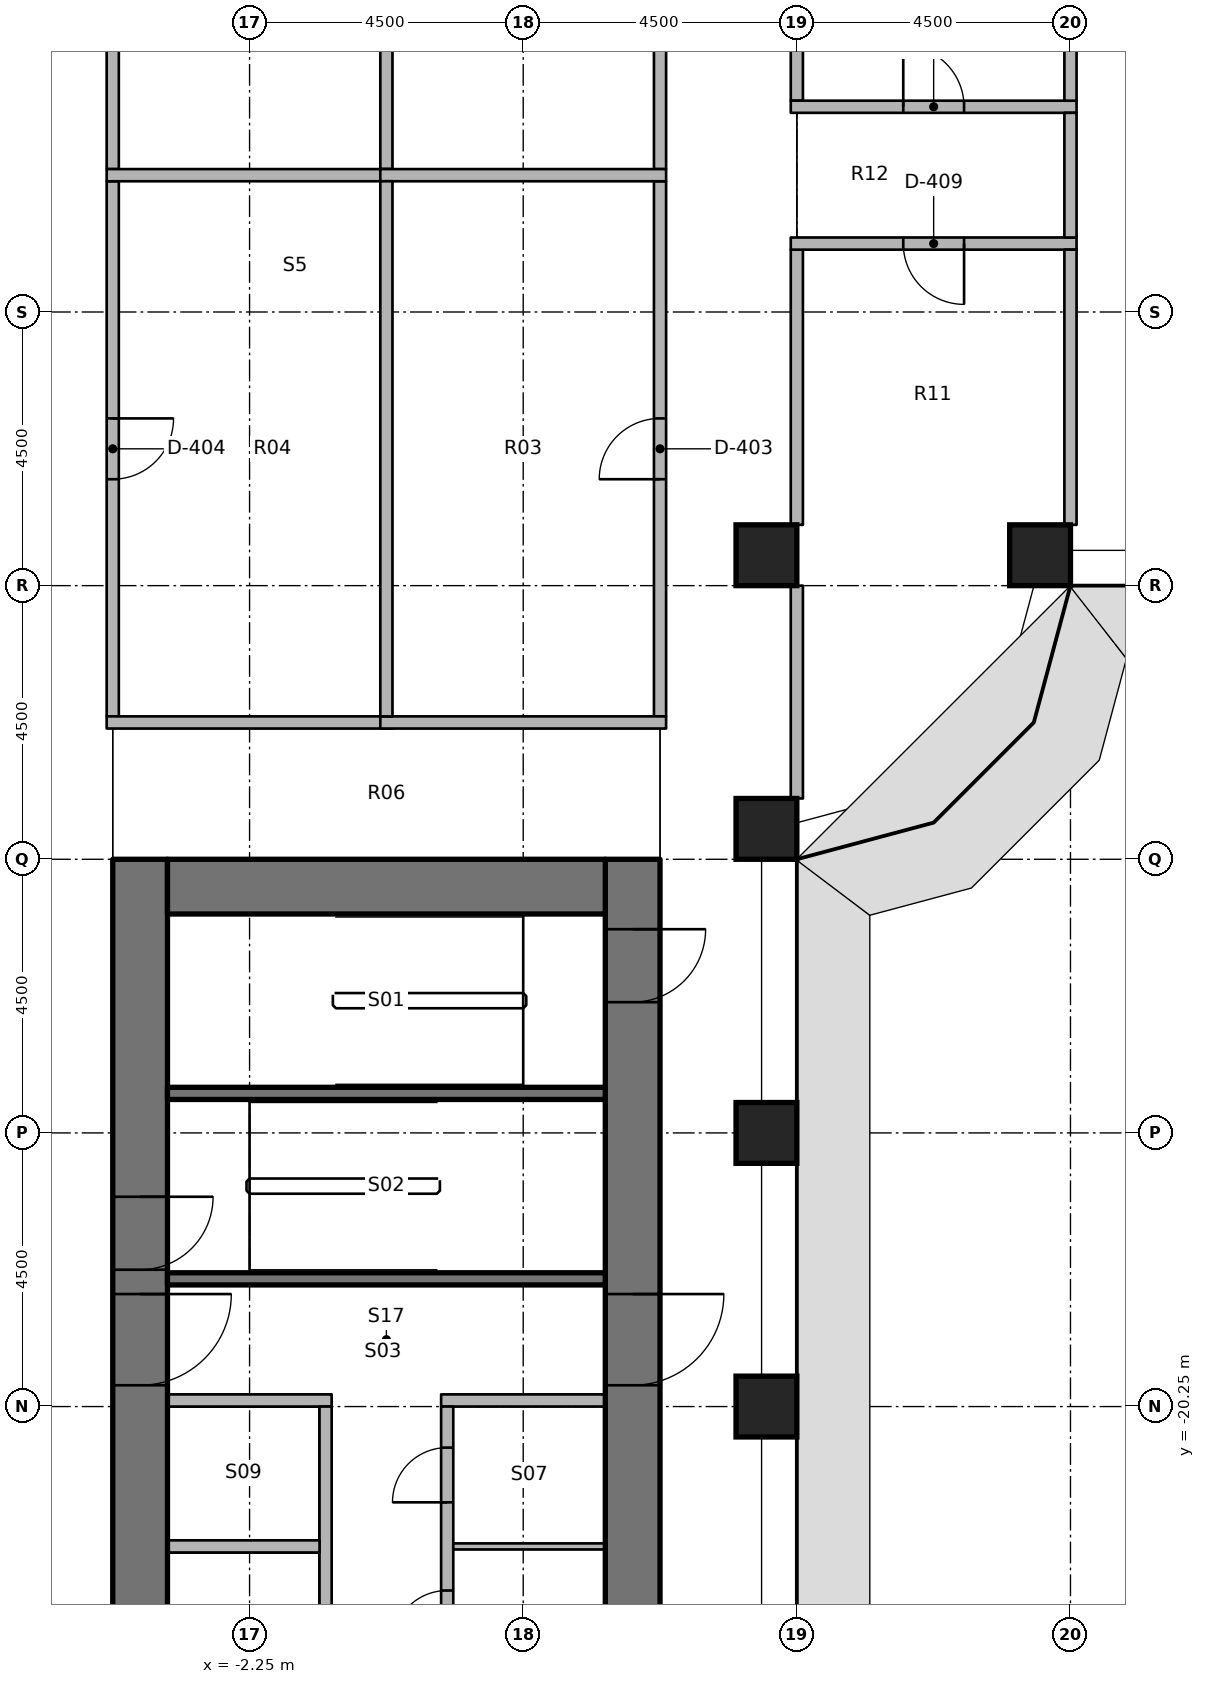
"""IFC4 building model, lengths in metres.
Left out: names, types, materials, properties, quantities, classifications, styles, units other than length and angle.
Written with IfcOpenShell. Run it as: python <this file> out.ifc"""

import sys

from ifc_helpers import new_model, si_unit, direction, frame, frame_2d, origin, origin_2d, place, context, subcontext, project, spatial, rectangle, extrude, element, fill, save


model = new_model("IFC4")
c1 = context("Model", 3, precision=1e-05, world=origin(), true_north=direction((0.0, 1.0)))
c2 = subcontext(c1, "Body", "Model", "MODEL_VIEW")
j1 = project(units=[si_unit("LENGTHUNIT", "METRE"), si_unit("PLANEANGLEUNIT", "RADIAN")], contexts=[c1])
p1 = place(None, origin())
s1 = spatial("IfcSite", under=j1, at=p1, CompositionType="ELEMENT")
p2 = place(p1, origin())
s2 = spatial("IfcBuilding", under=s1, at=p2, CompositionType="ELEMENT")
p3 = place(p2, frame((0.0, 0.0, 56.4)))
s3 = spatial("IfcBuildingStorey", under=s2, at=p3, CompositionType="ELEMENT", Elevation=56.4)
for number, where, z_axis, x_axis in (
    (1, (6.25, -20.25, 0.0), (0.0, 0.0, 1.0), (1.0, 0.0, 0.0)),
    (2, (6.25, -15.75, 0.0), (0.0, 0.0, 1.0), (1.0, 0.0, 0.0)),
    (3, (6.25, -10.75, 0.0), (0.0, 0.0, 1.0), (1.0, 0.0, 0.0)),
    (4, (6.25, -6.25, 0.0), (0.0, 0.0, 1.0), (1.0, 0.0, 0.0)),
    (5, (10.75, -6.25, 0.0), (0.0, 0.0, 1.0), (1.0, 0.0, 0.0)),
):
    element("IfcColumn", number, at=place(p3, frame(where, z_axis=z_axis, x_axis=x_axis)), inside=s3, PredefinedType="COLUMN", context=c2, shape_type="SweptSolid", body=[
        extrude(rectangle(XDim=1.0, YDim=1.0, at=origin_2d()), origin(), (0.0, 0.0, 1.0), 4.05),
    ])
p4 = place(p3, frame((-4.05, -11.25, 0.0), z_axis=(0.0, 0.0, 1.0), x_axis=(0.0, -1.0, 0.0)))
e6 = element("IfcWall", 6, at=p4, inside=s3, PredefinedType="SHEAR", context=c2, shape_type="SweptSolid", body=[
    extrude(rectangle(XDim=15.0, YDim=0.9, at=frame_2d((7.5, 0.0))), origin(), (0.0, 0.0, 1.0), 4.2),
])
p5 = place(p4, frame((7.15, 0.0, 0.0)))
e7 = element("IfcOpeningElement", 7, at=p5, cuts=e6, PredefinedType="OPENING", context=c2, shape_type="SweptSolid", body=[
    extrude(rectangle(XDim=1.5, YDim=2.3, at=frame_2d((0.75, 1.15))), frame((0.0, 0.46, 0.0), z_axis=(0.0, -1.0, 0.0), x_axis=(1.0, 0.0, 0.0)), (0.0, 0.0, 1.0), 0.92),
])
p6 = place(p4, frame((5.55, 0.0, 0.0)))
e8 = element("IfcOpeningElement", 8, at=p6, cuts=e6, PredefinedType="OPENING", context=c2, shape_type="SweptSolid", body=[
    extrude(rectangle(XDim=1.2, YDim=2.1, at=frame_2d((0.6, 1.05))), frame((0.0, 0.46, 0.0), z_axis=(0.0, -1.0, 0.0), x_axis=(1.0, 0.0, 0.0)), (0.0, 0.0, 1.0), 0.92),
])
p7 = place(p3, frame((4.05, -11.25, 0.0), z_axis=(0.0, 0.0, 1.0), x_axis=(0.0, -1.0, 0.0)))
e9 = element("IfcWall", 9, at=p7, inside=s3, PredefinedType="SHEAR", context=c2, shape_type="SweptSolid", body=[
    extrude(rectangle(XDim=15.0, YDim=0.9, at=frame_2d((7.5, 0.0))), origin(), (0.0, 0.0, 1.0), 4.2),
])
p8 = place(p7, frame((7.15, 0.0, 0.0)))
e10 = element("IfcOpeningElement", 10, at=p8, cuts=e9, PredefinedType="OPENING", context=c2, shape_type="SweptSolid", body=[
    extrude(rectangle(XDim=1.5, YDim=2.3, at=frame_2d((0.75, 1.15))), frame((0.0, 0.46, 0.0), z_axis=(0.0, -1.0, 0.0), x_axis=(1.0, 0.0, 0.0)), (0.0, 0.0, 1.0), 0.92),
])
p9 = place(p7, frame((13.9, 0.0, 0.0)))
e11 = element("IfcOpeningElement", 11, at=p9, cuts=e9, PredefinedType="OPENING", context=c2, shape_type="SweptSolid", body=[
    extrude(rectangle(XDim=0.9, YDim=2.1, at=frame_2d((0.45, 1.05))), frame((0.0, 0.46, 0.0), z_axis=(0.0, -1.0, 0.0), x_axis=(1.0, 0.0, 0.0)), (0.0, 0.0, 1.0), 0.92),
])
p10 = place(p7, frame((1.15, 0.0, 0.0)))
e12 = element("IfcOpeningElement", 12, at=p10, cuts=e9, PredefinedType="OPENING", context=c2, shape_type="SweptSolid", body=[
    extrude(rectangle(XDim=1.2, YDim=2.1, at=frame_2d((0.6, 1.05))), frame((0.0, 0.46, 0.0), z_axis=(0.0, -1.0, 0.0), x_axis=(1.0, 0.0, 0.0)), (0.0, 0.0, 1.0), 0.92),
])
p11 = place(p3, frame((-3.6, -11.7, 0.0), z_axis=(0.0, 0.0, 1.0), x_axis=(1.0, 0.0, 0.0)))
e13 = element("IfcWall", 13, at=p11, inside=s3, PredefinedType="SHEAR", context=c2, shape_type="SweptSolid", body=[
    extrude(rectangle(XDim=7.2, YDim=0.9, at=frame_2d((3.6, 0.0))), origin(), (0.0, 0.0, 1.0), 4.2),
])
for number, where, z_axis, x_axis in (
    (14, (3.6, -18.15, 0.0), (0.0, 0.0, 1.0), (-1.0, 0.0, 0.0)),
    (15, (3.6, -15.1, 0.0), (0.0, 0.0, 1.0), (-1.0, 0.0, 0.0)),
):
    element("IfcWall", number, at=place(p3, frame(where, z_axis=z_axis, x_axis=x_axis)), inside=s3, PredefinedType="SHEAR", context=c2, shape_type="SweptSolid", body=[
        extrude(rectangle(XDim=7.2, YDim=0.2, at=frame_2d((3.6, 0.0))), origin(), (0.0, 0.0, 1.0), 4.05),
    ])
p12 = place(p3, frame((3.6, -20.15, 0.0), z_axis=(0.0, 0.0, 1.0), x_axis=(-1.0, 0.0, 0.0)))
e16 = element("IfcWall", 16, at=p12, inside=s3, PredefinedType="PARTITIONING", context=c2, shape_type="SweptSolid", body=[
    extrude(rectangle(XDim=2.7, YDim=0.2, at=frame_2d((1.35, 0.0))), origin(), (0.0, 0.0, 1.0), 4.05),
])
p13 = place(p3, frame((1.0, -24.85, 0.0), z_axis=(0.0, 0.0, 1.0), x_axis=(0.0, 1.0, 0.0)))
e17 = element("IfcWall", 17, at=p13, inside=s3, PredefinedType="PARTITIONING", context=c2, shape_type="SweptSolid", body=[
    extrude(rectangle(XDim=4.6, YDim=0.2, at=frame_2d((2.3, 0.0))), origin(), (0.0, 0.0, 1.0), 4.05),
])
p14 = place(p13, frame((0.675, 0.0, 0.0)))
e18 = element("IfcOpeningElement", 18, at=p14, cuts=e17, PredefinedType="OPENING", context=c2, shape_type="SweptSolid", body=[
    extrude(rectangle(XDim=0.9, YDim=2.1, at=frame_2d((0.45, 1.05))), frame((0.0, 0.11, 0.0), z_axis=(0.0, -1.0, 0.0), x_axis=(1.0, 0.0, 0.0)), (0.0, 0.0, 1.0), 0.22),
])
p15 = place(p13, frame((3.025, 0.0, 0.0)))
e19 = element("IfcOpeningElement", 19, at=p15, cuts=e17, PredefinedType="OPENING", context=c2, shape_type="SweptSolid", body=[
    extrude(rectangle(XDim=0.9, YDim=2.1, at=frame_2d((0.45, 1.05))), frame((0.0, 0.11, 0.0), z_axis=(0.0, -1.0, 0.0), x_axis=(1.0, 0.0, 0.0)), (0.0, 0.0, 1.0), 0.22),
])
p16 = place(p3, frame((-0.9, -20.15, 0.0), z_axis=(0.0, 0.0, 1.0), x_axis=(-1.0, 0.0, 0.0)))
e20 = element("IfcWall", 20, at=p16, inside=s3, PredefinedType="PARTITIONING", context=c2, shape_type="SweptSolid", body=[
    extrude(rectangle(XDim=2.7, YDim=0.2, at=frame_2d((1.35, 0.0))), origin(), (0.0, 0.0, 1.0), 4.05),
])
p17 = place(p3, frame((-1.0, -24.85, 0.0), z_axis=(0.0, 0.0, 1.0), x_axis=(0.0, 1.0, 0.0)))
e21 = element("IfcWall", 21, at=p17, inside=s3, PredefinedType="PARTITIONING", context=c2, shape_type="SweptSolid", body=[
    extrude(rectangle(XDim=4.6, YDim=0.2, at=frame_2d((2.3, 0.0))), origin(), (0.0, 0.0, 1.0), 4.05),
])
p18 = place(p3, frame((3.6, -22.55, 0.0), z_axis=(0.0, 0.0, 1.0), x_axis=(-1.0, 0.0, 0.0)))
e22 = element("IfcWall", 22, at=p18, inside=s3, PredefinedType="PARTITIONING", context=c2, shape_type="SweptSolid", body=[
    extrude(rectangle(XDim=2.5, YDim=0.1, at=frame_2d((1.25, 0.0))), origin(), (0.0, 0.0, 1.0), 4.05),
])
p19 = place(p3, frame((-1.1, -22.55, 0.0), z_axis=(0.0, 0.0, 1.0), x_axis=(-1.0, 0.0, 0.0)))
e23 = element("IfcWall", 23, at=p19, inside=s3, PredefinedType="PARTITIONING", context=c2, shape_type="SweptSolid", body=[
    extrude(rectangle(XDim=2.5, YDim=0.2, at=frame_2d((1.25, 0.0))), origin(), (0.0, 0.0, 1.0), 4.05),
])
p20 = place(p3, frame((-4.5, 8.9, 0.0), z_axis=(0.0, 0.0, 1.0), x_axis=(0.0, -1.0, 0.0)))
e24 = element("IfcWall", 24, at=p20, inside=s3, PredefinedType="PARTITIONING", context=c2, shape_type="SweptSolid", body=[
    extrude(rectangle(XDim=8.8, YDim=0.2, at=frame_2d((4.4, 0.0))), origin(), (0.0, 0.0, 1.0), 3.131),
])
p21 = place(p20, frame((3.9, 0.0, 0.0)))
e25 = element("IfcOpeningElement", 25, at=p21, cuts=e24, PredefinedType="OPENING", context=c2, shape_type="SweptSolid", body=[
    extrude(rectangle(XDim=1.0, YDim=2.1, at=frame_2d((0.5, 1.05))), frame((0.0, 0.11, 0.0), z_axis=(0.0, -1.0, 0.0), x_axis=(1.0, 0.0, 0.0)), (0.0, 0.0, 1.0), 0.22),
])
p22 = place(p3, frame((-4.5, -0.1, 0.0), z_axis=(0.0, 0.0, 1.0), x_axis=(0.0, -1.0, 0.0)))
e26 = element("IfcWall", 26, at=p22, inside=s3, PredefinedType="PARTITIONING", context=c2, shape_type="SweptSolid", body=[
    extrude(rectangle(XDim=8.8, YDim=0.2, at=frame_2d((4.4, 0.0))), origin(), (0.0, 0.0, 1.0), 3.131),
])
p23 = place(p22, frame((3.9, 0.0, 0.0)))
e27 = element("IfcOpeningElement", 27, at=p23, cuts=e26, PredefinedType="OPENING", context=c2, shape_type="SweptSolid", body=[
    extrude(rectangle(XDim=1.0, YDim=2.1, at=frame_2d((0.5, 1.05))), frame((0.0, 0.11, 0.0), z_axis=(0.0, -1.0, 0.0), x_axis=(1.0, 0.0, 0.0)), (0.0, 0.0, 1.0), 0.22),
])
p24 = place(p3, frame((4.5, 0.1, 0.0), z_axis=(0.0, 0.0, 1.0), x_axis=(0.0, 1.0, 0.0)))
e28 = element("IfcWall", 28, at=p24, inside=s3, PredefinedType="PARTITIONING", context=c2, shape_type="SweptSolid", body=[
    extrude(rectangle(XDim=8.8, YDim=0.2, at=frame_2d((4.4, 0.0))), origin(), (0.0, 0.0, 1.0), 3.131),
])
p25 = place(p24, frame((3.9, 0.0, 0.0)))
e29 = element("IfcOpeningElement", 29, at=p25, cuts=e28, PredefinedType="OPENING", context=c2, shape_type="SweptSolid", body=[
    extrude(rectangle(XDim=1.0, YDim=2.1, at=frame_2d((0.5, 1.05))), frame((0.0, 0.11, 0.0), z_axis=(0.0, -1.0, 0.0), x_axis=(1.0, 0.0, 0.0)), (0.0, 0.0, 1.0), 0.22),
])
p26 = place(p3, frame((4.5, -8.9, 0.0), z_axis=(0.0, 0.0, 1.0), x_axis=(0.0, 1.0, 0.0)))
e30 = element("IfcWall", 30, at=p26, inside=s3, PredefinedType="PARTITIONING", context=c2, shape_type="SweptSolid", body=[
    extrude(rectangle(XDim=8.8, YDim=0.2, at=frame_2d((4.4, 0.0))), origin(), (0.0, 0.0, 1.0), 3.131),
])
p27 = place(p26, frame((3.9, 0.0, 0.0)))
e31 = element("IfcOpeningElement", 31, at=p27, cuts=e30, PredefinedType="OPENING", context=c2, shape_type="SweptSolid", body=[
    extrude(rectangle(XDim=1.0, YDim=2.1, at=frame_2d((0.5, 1.05))), frame((0.0, 0.11, 0.0), z_axis=(0.0, -1.0, 0.0), x_axis=(1.0, 0.0, 0.0)), (0.0, 0.0, 1.0), 0.22),
])
p28 = place(p3, frame((6.75, 1.225, 0.0), z_axis=(0.0, 0.0, 1.0), x_axis=(0.0, 1.0, 0.0)))
e32 = element("IfcWall", 32, at=p28, inside=s3, PredefinedType="PARTITIONING", context=c2, shape_type="SweptSolid", body=[
    extrude(rectangle(XDim=4.525, YDim=0.2, at=frame_2d((2.262, 0.0))), origin(), (0.0, 0.0, 1.0), 3.131),
])
p29 = place(p3, frame((6.75, -10.25, 0.0), z_axis=(0.0, 0.0, 1.0), x_axis=(0.0, 1.0, 0.0)))
e33 = element("IfcWall", 33, at=p29, inside=s3, PredefinedType="PARTITIONING", context=c2, shape_type="SweptSolid", body=[
    extrude(rectangle(XDim=3.5, YDim=0.2, at=frame_2d((1.75, 0.0))), origin(), (0.0, 0.0, 1.0), 3.131),
])
p30 = place(p3, frame((6.75, -5.75, 0.0), z_axis=(0.0, 0.0, 1.0), x_axis=(0.0, 1.0, 0.0)))
e34 = element("IfcWall", 34, at=p30, inside=s3, PredefinedType="PARTITIONING", context=c2, shape_type="SweptSolid", body=[
    extrude(rectangle(XDim=4.525, YDim=0.2, at=frame_2d((2.262, 0.0))), origin(), (0.0, 0.0, 1.0), 3.131),
])
for number, where, z_axis, x_axis in (
    (35, (-4.6, -9.0, 0.0), (0.0, 0.0, 1.0), (1.0, 0.0, 0.0)),
    (36, (-0.1, -9.0, 0.0), (0.0, 0.0, 1.0), (1.0, 0.0, 0.0)),
):
    element("IfcWall", number, at=place(p3, frame(where, z_axis=z_axis, x_axis=x_axis)), inside=s3, PredefinedType="PARTITIONING", context=c2, shape_type="SweptSolid", body=[
        extrude(rectangle(XDim=4.7, YDim=0.2, at=frame_2d((2.35, 0.0))), origin(), (0.0, 0.0, 1.0), 3.131),
    ])
p31 = place(p3, frame((0.0, 0.1, 0.0), z_axis=(0.0, 0.0, 1.0), x_axis=(0.0, 1.0, 0.0)))
e37 = element("IfcWall", 37, at=p31, inside=s3, PredefinedType="PARTITIONING", context=c2, shape_type="SweptSolid", body=[
    extrude(rectangle(XDim=8.8, YDim=0.2, at=frame_2d((4.4, 0.0))), origin(), (0.0, 0.0, 1.0), 3.131),
])
for number, where, z_axis, x_axis in (
    (38, (-4.6, 0.0, 0.0), (0.0, 0.0, 1.0), (1.0, 0.0, 0.0)),
    (39, (-0.1, 0.0, 0.0), (0.0, 0.0, 1.0), (1.0, 0.0, 0.0)),
):
    element("IfcWall", number, at=place(p3, frame(where, z_axis=z_axis, x_axis=x_axis)), inside=s3, PredefinedType="PARTITIONING", context=c2, shape_type="SweptSolid", body=[
        extrude(rectangle(XDim=4.7, YDim=0.2, at=frame_2d((2.35, 0.0))), origin(), (0.0, 0.0, 1.0), 3.131),
    ])
p32 = place(p3, frame((0.0, -8.9, 0.0), z_axis=(0.0, 0.0, 1.0), x_axis=(0.0, 1.0, 0.0)))
e40 = element("IfcWall", 40, at=p32, inside=s3, PredefinedType="PARTITIONING", context=c2, shape_type="SweptSolid", body=[
    extrude(rectangle(XDim=8.8, YDim=0.2, at=frame_2d((4.4, 0.0))), origin(), (0.0, 0.0, 1.0), 3.131),
])
p33 = place(p3, frame((6.65, 1.125, 0.0), z_axis=(0.0, 0.0, 1.0), x_axis=(1.0, 0.0, 0.0)))
e41 = element("IfcWall", 41, at=p33, inside=s3, PredefinedType="PARTITIONING", context=c2, shape_type="SweptSolid", body=[
    extrude(rectangle(XDim=4.7, YDim=0.2, at=frame_2d((2.35, 0.0))), origin(), (0.0, 0.0, 1.0), 3.131),
])
p34 = place(p33, frame((1.85, 0.0, 0.0)))
e42 = element("IfcOpeningElement", 42, at=p34, cuts=e41, PredefinedType="OPENING", context=c2, shape_type="SweptSolid", body=[
    extrude(rectangle(XDim=1.0, YDim=2.1, at=frame_2d((0.5, 1.05))), frame((0.0, 0.11, 0.0), z_axis=(0.0, -1.0, 0.0), x_axis=(1.0, 0.0, 0.0)), (0.0, 0.0, 1.0), 0.22),
])
p35 = place(p3, frame((11.35, -1.125, 0.0), z_axis=(0.0, 0.0, 1.0), x_axis=(-1.0, 0.0, 0.0)))
e43 = element("IfcWall", 43, at=p35, inside=s3, PredefinedType="PARTITIONING", context=c2, shape_type="SweptSolid", body=[
    extrude(rectangle(XDim=4.7, YDim=0.2, at=frame_2d((2.35, 0.0))), origin(), (0.0, 0.0, 1.0), 3.131),
])
p36 = place(p35, frame((1.85, 0.0, 0.0)))
e44 = element("IfcOpeningElement", 44, at=p36, cuts=e43, PredefinedType="OPENING", context=c2, shape_type="SweptSolid", body=[
    extrude(rectangle(XDim=1.0, YDim=2.1, at=frame_2d((0.5, 1.05))), frame((0.0, 0.11, 0.0), z_axis=(0.0, -1.0, 0.0), x_axis=(1.0, 0.0, 0.0)), (0.0, 0.0, 1.0), 0.22),
])
p37 = place(p3, frame((11.25, -1.025, 0.0), z_axis=(0.0, 0.0, 1.0), x_axis=(0.0, 1.0, 0.0)))
e45 = element("IfcWall", 45, at=p37, inside=s3, PredefinedType="PARTITIONING", context=c2, shape_type="SweptSolid", body=[
    extrude(rectangle(XDim=2.05, YDim=0.2, at=frame_2d((1.025, 0.0))), origin(), (0.0, 0.0, 1.0), 3.131),
])
p38 = place(p3, frame((11.25, 5.75, 0.0), z_axis=(0.0, 0.0, 1.0), x_axis=(0.0, -1.0, 0.0)))
e46 = element("IfcWall", 46, at=p38, inside=s3, PredefinedType="PARTITIONING", context=c2, shape_type="SweptSolid", body=[
    extrude(rectangle(XDim=4.525, YDim=0.2, at=frame_2d((2.262, 0.0))), origin(), (0.0, 0.0, 1.0), 3.131),
])
p39 = place(p38, frame((1.363, 0.0, 0.0)))
e47 = element("IfcOpeningElement", 47, at=p39, cuts=e46, PredefinedType="OPENING", context=c2, shape_type="SweptSolid", body=[
    extrude(rectangle(XDim=1.8, YDim=2.1, at=frame_2d((0.9, 1.05))), frame((0.0, 0.11, 0.0), z_axis=(0.0, -1.0, 0.0), x_axis=(1.0, 0.0, 0.0)), (0.0, 0.0, 1.0), 0.22),
])
p40 = place(p3, frame((11.25, -5.75, 0.0), z_axis=(0.0, 0.0, 1.0), x_axis=(0.0, 1.0, 0.0)))
e48 = element("IfcWall", 48, at=p40, inside=s3, PredefinedType="PARTITIONING", context=c2, shape_type="SweptSolid", body=[
    extrude(rectangle(XDim=4.525, YDim=0.2, at=frame_2d((2.262, 0.0))), origin(), (0.0, 0.0, 1.0), 3.131),
])
p41 = place(p8, origin())
e49 = element("IfcDoor", 49, at=p41, inside=s3, OperationType="DOUBLE_DOOR_SINGLE_SWING", PredefinedType="DOOR", context=c2, shape_type="SweptSolid", body=[
    extrude(rectangle(XDim=1.5, YDim=2.3, at=frame_2d((0.75, 1.15))), frame((0.0, 0.025, 0.0), z_axis=(0.0, -1.0, 0.0), x_axis=(1.0, 0.0, 0.0)), (0.0, 0.0, 1.0), 0.05),
])
fill(e10, e49)
p42 = place(p5, origin())
e50 = element("IfcDoor", 50, at=p42, inside=s3, OperationType="DOUBLE_DOOR_SINGLE_SWING", PredefinedType="DOOR", context=c2, shape_type="SweptSolid", body=[
    extrude(rectangle(XDim=1.5, YDim=2.3, at=frame_2d((0.75, 1.15))), frame((0.0, 0.025, 0.0), z_axis=(0.0, -1.0, 0.0), x_axis=(1.0, 0.0, 0.0)), (0.0, 0.0, 1.0), 0.05),
])
fill(e7, e50)
p43 = place(p6, origin())
e51 = element("IfcDoor", 51, at=p43, inside=s3, OperationType="SINGLE_SWING_LEFT", PredefinedType="DOOR", context=c2, shape_type="SweptSolid", body=[
    extrude(rectangle(XDim=1.2, YDim=2.1, at=frame_2d((0.6, 1.05))), frame((0.0, 0.025, 0.0), z_axis=(0.0, -1.0, 0.0), x_axis=(1.0, 0.0, 0.0)), (0.0, 0.0, 1.0), 0.05),
])
fill(e8, e51)
p44 = place(p10, origin())
e52 = element("IfcDoor", 52, at=p44, inside=s3, OperationType="SINGLE_SWING_LEFT", PredefinedType="DOOR", context=c2, shape_type="SweptSolid", body=[
    extrude(rectangle(XDim=1.2, YDim=2.1, at=frame_2d((0.6, 1.05))), frame((0.0, 0.025, 0.0), z_axis=(0.0, -1.0, 0.0), x_axis=(1.0, 0.0, 0.0)), (0.0, 0.0, 1.0), 0.05),
])
fill(e12, e52)
p45 = place(p14, origin())
e53 = element("IfcDoor", 53, at=p45, inside=s3, OperationType="SINGLE_SWING_LEFT", PredefinedType="DOOR", context=c2, shape_type="SweptSolid", body=[
    extrude(rectangle(XDim=0.9, YDim=2.1, at=frame_2d((0.45, 1.05))), frame((0.0, 0.025, 0.0), z_axis=(0.0, -1.0, 0.0), x_axis=(1.0, 0.0, 0.0)), (0.0, 0.0, 1.0), 0.05),
])
fill(e18, e53)
p46 = place(p15, origin())
e54 = element("IfcDoor", 54, at=p46, inside=s3, OperationType="SINGLE_SWING_LEFT", PredefinedType="DOOR", context=c2, shape_type="SweptSolid", body=[
    extrude(rectangle(XDim=0.9, YDim=2.1, at=frame_2d((0.45, 1.05))), frame((0.0, 0.025, 0.0), z_axis=(0.0, -1.0, 0.0), x_axis=(1.0, 0.0, 0.0)), (0.0, 0.0, 1.0), 0.05),
])
fill(e19, e54)
p47 = place(p27, origin())
e55 = element("IfcDoor", 55, at=p47, inside=s3, OperationType="SINGLE_SWING_RIGHT", PredefinedType="DOOR", context=c2, shape_type="SweptSolid", body=[
    extrude(rectangle(XDim=1.0, YDim=2.1, at=frame_2d((0.5, 1.05))), frame((0.0, 0.025, 0.0), z_axis=(0.0, -1.0, 0.0), x_axis=(1.0, 0.0, 0.0)), (0.0, 0.0, 1.0), 0.05),
])
fill(e31, e55)
p48 = place(p23, origin())
e56 = element("IfcDoor", 56, at=p48, inside=s3, OperationType="SINGLE_SWING_RIGHT", PredefinedType="DOOR", context=c2, shape_type="SweptSolid", body=[
    extrude(rectangle(XDim=1.0, YDim=2.1, at=frame_2d((0.5, 1.05))), frame((0.0, 0.025, 0.0), z_axis=(0.0, -1.0, 0.0), x_axis=(1.0, 0.0, 0.0)), (0.0, 0.0, 1.0), 0.05),
])
fill(e27, e56)
p49 = place(p34, origin())
e57 = element("IfcDoor", 57, at=p49, inside=s3, OperationType="SINGLE_SWING_RIGHT", PredefinedType="DOOR", context=c2, shape_type="SweptSolid", body=[
    extrude(rectangle(XDim=1.0, YDim=2.1, at=frame_2d((0.5, 1.05))), frame((0.0, 0.025, 0.0), z_axis=(0.0, -1.0, 0.0), x_axis=(1.0, 0.0, 0.0)), (0.0, 0.0, 1.0), 0.05),
])
fill(e42, e57)
p50 = place(p36, origin())
e58 = element("IfcDoor", 58, at=p50, inside=s3, OperationType="SINGLE_SWING_RIGHT", PredefinedType="DOOR", context=c2, shape_type="SweptSolid", body=[
    extrude(rectangle(XDim=1.0, YDim=2.1, at=frame_2d((0.5, 1.05))), frame((0.0, 0.025, 0.0), z_axis=(0.0, -1.0, 0.0), x_axis=(1.0, 0.0, 0.0)), (0.0, 0.0, 1.0), 0.05),
])
fill(e44, e58)
save(model, sys.argv[1])
